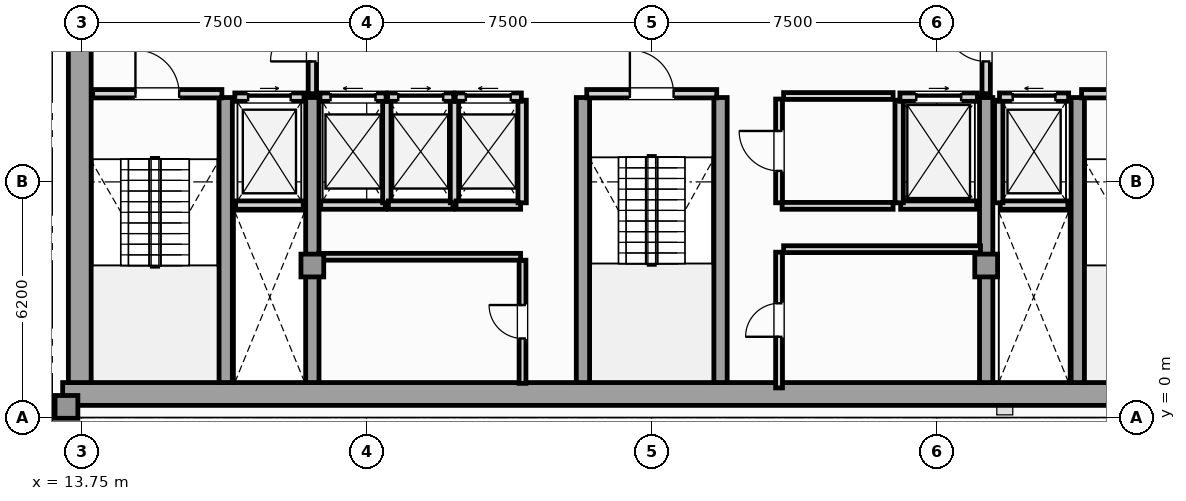
"""IFC4 building model, lengths in metres.
Left out: names, types, materials, properties, quantities, classifications, styles, units other than length and angle.
Written with IfcOpenShell. Run it as: python <this file> out.ifc"""

import sys

from ifc_helpers import new_model, si_unit, direction, frame, frame_2d, origin, origin_2d, place, context, subcontext, project, spatial, rectangle, extrude, element, fill, save


model = new_model("IFC4")
c1 = context("Model", 3, precision=1e-05, world=origin(), true_north=direction((0.0, 1.0)))
c2 = subcontext(c1, "Body", "Model", "MODEL_VIEW")
j1 = project(units=[si_unit("LENGTHUNIT", "METRE"), si_unit("PLANEANGLEUNIT", "RADIAN")], contexts=[c1])
p1 = place(None, origin())
s1 = spatial("IfcSite", under=j1, at=p1, CompositionType="ELEMENT")
p2 = place(p1, origin())
s2 = spatial("IfcBuilding", under=s1, at=p2, CompositionType="ELEMENT")
p3 = place(p2, frame((0.0, 0.0, 260.6)))
s3 = spatial("IfcBuildingStorey", under=s2, at=p3, CompositionType="ELEMENT", Elevation=260.6)
p4 = place(p3, frame((13.25, 0.62, 0.0), z_axis=(0.0, 0.0, 1.0), x_axis=(1.0, 0.0, 0.0)))
e1 = element("IfcWall", 1, at=p4, inside=s3, PredefinedType="SHEAR", context=c2, shape_type="SweptSolid", body=[
    extrude(rectangle(XDim=31.0, YDim=0.6, at=frame_2d((15.5, 0.0))), origin(), (0.0, 0.0, 1.0), 3.65),
])
p5 = place(p3, frame((13.7, 0.92, 0.0), z_axis=(0.0, 0.0, 1.0), x_axis=(0.0, 1.0, 0.0)))
e2 = element("IfcWall", 2, at=p5, inside=s3, PredefinedType="SHEAR", context=c2, shape_type="SweptSolid", body=[
    extrude(rectangle(XDim=10.53, YDim=0.6, at=frame_2d((5.265, 0.0))), origin(), (0.0, 0.0, 1.0), 3.65),
])
for number, where, z_axis, x_axis in (
    (3, (17.54, 0.92, 0.0), (0.0, 0.0, 1.0), (0.0, 1.0, 0.0)),
    (4, (19.82, 0.92, 0.0), (0.0, 0.0, 1.0), (0.0, 1.0, 0.0)),
    (5, (26.94, 0.92, 0.0), (0.0, 0.0, 1.0), (0.0, 1.0, 0.0)),
    (6, (30.56, 0.92, 0.0), (0.0, 0.0, 1.0), (0.0, 1.0, 0.0)),
    (7, (37.55, 0.92, 0.0), (0.0, 0.0, 1.0), (0.0, 1.0, 0.0)),
    (8, (39.96, 0.92, 0.0), (0.0, 0.0, 1.0), (0.0, 1.0, 0.0)),
):
    element("IfcWall", number, at=place(p3, frame(where, z_axis=z_axis, x_axis=x_axis)), inside=s3, PredefinedType="SHEAR", context=c2, shape_type="SweptSolid", body=[
        extrude(rectangle(XDim=7.5, YDim=0.35, at=frame_2d((3.75, 0.0))), origin(), (0.0, 0.0, 1.0), 3.65),
    ])
for number, where, z_axis, x_axis in (
    (9, (13.35, 0.28, 0.0), (0.0, 0.0, 1.0), (1.0, 0.0, 0.0)),
    (10, (19.82, 4.0, 0.0), (0.0, 0.0, 1.0), (1.0, 0.0, 0.0)),
    (11, (37.55, 4.0, 0.0), (0.0, 0.0, 1.0), (1.0, 0.0, 0.0)),
):
    element("IfcColumn", number, at=place(p3, frame(where, z_axis=z_axis, x_axis=x_axis)), inside=s3, PredefinedType="COLUMN", context=c2, shape_type="SweptSolid", body=[
        extrude(rectangle(XDim=0.6, YDim=0.6, at=origin_2d()), origin(), (0.0, 0.0, 1.0), 3.85),
    ])
p6 = place(p3, frame((11.238, 0.18, 0.0), z_axis=(0.0, 0.0, 1.0), x_axis=(1.0, 0.0, 0.0)))
e12 = element("IfcWall", 12, at=p6, inside=s3, PredefinedType="SOLIDWALL", context=c2, shape_type="SweptSolid", body=[
    extrude(rectangle(XDim=2.012, YDim=0.26, at=frame_2d((1.006, 0.0))), origin(), (0.0, 0.0, 1.0), 3.65),
])
p7 = place(p3, frame((17.8, 5.59, 0.0), z_axis=(0.0, 0.0, 1.0), x_axis=(1.0, 0.0, 0.0)))
e13 = element("IfcWall", 13, at=p7, inside=s3, PredefinedType="SOLIDWALL", context=c2, shape_type="SweptSolid", body=[
    extrude(rectangle(XDim=1.78, YDim=0.22, at=frame_2d((0.89, 0.0))), origin(), (0.0, 0.0, 1.0), 3.65),
])
p8 = place(p3, frame((17.78, 8.43, 0.0), z_axis=(0.0, 0.0, 1.0), x_axis=(1.0, 0.0, 0.0)))
e14 = element("IfcWall", 14, at=p8, inside=s3, PredefinedType="SOLIDWALL", context=c2, shape_type="SweptSolid", body=[
    extrude(rectangle(XDim=1.82, YDim=0.22, at=frame_2d((0.91, 0.0))), origin(), (0.0, 0.0, 1.0), 3.65),
])
p9 = place(p8, frame((0.35, 0.0, 0.0)))
e15 = element("IfcOpeningElement", 15, at=p9, cuts=e14, PredefinedType="OPENING", context=c2, shape_type="SweptSolid", body=[
    extrude(rectangle(XDim=1.12, YDim=2.25, at=frame_2d((0.56, 1.125))), frame((0.0, 0.12, 0.0), z_axis=(0.0, -1.0, 0.0), x_axis=(1.0, 0.0, 0.0)), (0.0, 0.0, 1.0), 0.24),
])
p10 = place(p3, frame((37.92, 5.59, 0.0), z_axis=(0.0, 0.0, 1.0), x_axis=(1.0, 0.0, 0.0)))
e16 = element("IfcWall", 16, at=p10, inside=s3, PredefinedType="SOLIDWALL", context=c2, shape_type="SweptSolid", body=[
    extrude(rectangle(XDim=1.78, YDim=0.22, at=frame_2d((0.89, 0.0))), origin(), (0.0, 0.0, 1.0), 3.65),
])
p11 = place(p3, frame((37.88, 5.65, 0.0), z_axis=(0.0, 0.0, 1.0), x_axis=(0.0, 1.0, 0.0)))
e17 = element("IfcWall", 17, at=p11, inside=s3, PredefinedType="SOLIDWALL", context=c2, shape_type="SweptSolid", body=[
    extrude(rectangle(XDim=2.7, YDim=0.22, at=frame_2d((1.35, 0.0))), origin(), (0.0, 0.0, 1.0), 3.65),
])
p12 = place(p3, frame((37.9, 8.43, 0.0), z_axis=(0.0, 0.0, 1.0), x_axis=(1.0, 0.0, 0.0)))
e18 = element("IfcWall", 18, at=p12, inside=s3, PredefinedType="SOLIDWALL", context=c2, shape_type="SweptSolid", body=[
    extrude(rectangle(XDim=1.82, YDim=0.22, at=frame_2d((0.91, 0.0))), origin(), (0.0, 0.0, 1.0), 3.65),
])
p13 = place(p12, frame((0.35, 0.0, 0.0)))
e19 = element("IfcOpeningElement", 19, at=p13, cuts=e18, PredefinedType="OPENING", context=c2, shape_type="SweptSolid", body=[
    extrude(rectangle(XDim=1.12, YDim=2.25, at=frame_2d((0.56, 1.125))), frame((0.0, 0.12, 0.0), z_axis=(0.0, -1.0, 0.0), x_axis=(1.0, 0.0, 0.0)), (0.0, 0.0, 1.0), 0.24),
])
p14 = place(p3, frame((35.3, 5.59, 0.0), z_axis=(0.0, 0.0, 1.0), x_axis=(1.0, 0.0, 0.0)))
e20 = element("IfcWall", 20, at=p14, inside=s3, PredefinedType="SOLIDWALL", context=c2, shape_type="SweptSolid", body=[
    extrude(rectangle(XDim=2.0, YDim=0.22, at=frame_2d((1.0, 0.0))), origin(), (0.0, 0.0, 1.0), 3.65),
])
p15 = place(p3, frame((35.26, 5.65, 0.0), z_axis=(0.0, 0.0, 1.0), x_axis=(0.0, 1.0, 0.0)))
e21 = element("IfcWall", 21, at=p15, inside=s3, PredefinedType="SOLIDWALL", context=c2, shape_type="SweptSolid", body=[
    extrude(rectangle(XDim=2.7, YDim=0.22, at=frame_2d((1.35, 0.0))), origin(), (0.0, 0.0, 1.0), 3.65),
])
p16 = place(p3, frame((35.28, 8.43, 0.0), z_axis=(0.0, 0.0, 1.0), x_axis=(1.0, 0.0, 0.0)))
e22 = element("IfcWall", 22, at=p16, inside=s3, PredefinedType="SOLIDWALL", context=c2, shape_type="SweptSolid", body=[
    extrude(rectangle(XDim=2.04, YDim=0.22, at=frame_2d((1.02, 0.0))), origin(), (0.0, 0.0, 1.0), 3.65),
])
p17 = place(p16, frame((0.43, 0.0, 0.0)))
e23 = element("IfcOpeningElement", 23, at=p17, cuts=e22, PredefinedType="OPENING", context=c2, shape_type="SweptSolid", body=[
    extrude(rectangle(XDim=1.18, YDim=2.2, at=frame_2d((0.59, 1.1))), frame((0.0, 0.12, 0.0), z_axis=(0.0, -1.0, 0.0), x_axis=(1.0, 0.0, 0.0)), (0.0, 0.0, 1.0), 0.24),
])
p18 = place(p3, frame((20.04, 5.59, 0.0), z_axis=(0.0, 0.0, 1.0), x_axis=(1.0, 0.0, 0.0)))
e24 = element("IfcWall", 24, at=p18, inside=s3, PredefinedType="SOLIDWALL", context=c2, shape_type="SweptSolid", body=[
    extrude(rectangle(XDim=1.7, YDim=0.22, at=frame_2d((0.85, 0.0))), origin(), (0.0, 0.0, 1.0), 3.65),
])
p19 = place(p3, frame((21.78, 5.65, 0.0), z_axis=(0.0, 0.0, 1.0), x_axis=(0.0, 1.0, 0.0)))
e25 = element("IfcWall", 25, at=p19, inside=s3, PredefinedType="SOLIDWALL", context=c2, shape_type="SweptSolid", body=[
    extrude(rectangle(XDim=2.7, YDim=0.22, at=frame_2d((1.35, 0.0))), origin(), (0.0, 0.0, 1.0), 3.65),
])
p20 = place(p3, frame((20.02, 8.43, 0.0), z_axis=(0.0, 0.0, 1.0), x_axis=(1.0, 0.0, 0.0)))
e26 = element("IfcWall", 26, at=p20, inside=s3, PredefinedType="SOLIDWALL", context=c2, shape_type="SweptSolid", body=[
    extrude(rectangle(XDim=1.74, YDim=0.22, at=frame_2d((0.87, 0.0))), origin(), (0.0, 0.0, 1.0), 3.65),
])
p21 = place(p20, frame((0.28, 0.0, 0.0)))
e27 = element("IfcOpeningElement", 27, at=p21, cuts=e26, PredefinedType="OPENING", context=c2, shape_type="SweptSolid", body=[
    extrude(rectangle(XDim=1.18, YDim=2.2, at=frame_2d((0.59, 1.1))), frame((0.0, 0.12, 0.0), z_axis=(0.0, -1.0, 0.0), x_axis=(1.0, 0.0, 0.0)), (0.0, 0.0, 1.0), 0.24),
])
p22 = place(p3, frame((21.82, 5.59, 0.0), z_axis=(0.0, 0.0, 1.0), x_axis=(1.0, 0.0, 0.0)))
e28 = element("IfcWall", 28, at=p22, inside=s3, PredefinedType="SOLIDWALL", context=c2, shape_type="SweptSolid", body=[
    extrude(rectangle(XDim=1.7, YDim=0.22, at=frame_2d((0.85, 0.0))), origin(), (0.0, 0.0, 1.0), 3.65),
])
p23 = place(p3, frame((23.56, 5.65, 0.0), z_axis=(0.0, 0.0, 1.0), x_axis=(0.0, 1.0, 0.0)))
e29 = element("IfcWall", 29, at=p23, inside=s3, PredefinedType="SOLIDWALL", context=c2, shape_type="SweptSolid", body=[
    extrude(rectangle(XDim=2.7, YDim=0.22, at=frame_2d((1.35, 0.0))), origin(), (0.0, 0.0, 1.0), 3.65),
])
p24 = place(p3, frame((21.8, 8.43, 0.0), z_axis=(0.0, 0.0, 1.0), x_axis=(1.0, 0.0, 0.0)))
e30 = element("IfcWall", 30, at=p24, inside=s3, PredefinedType="SOLIDWALL", context=c2, shape_type="SweptSolid", body=[
    extrude(rectangle(XDim=1.74, YDim=0.22, at=frame_2d((0.87, 0.0))), origin(), (0.0, 0.0, 1.0), 3.65),
])
p25 = place(p24, frame((0.28, 0.0, 0.0)))
e31 = element("IfcOpeningElement", 31, at=p25, cuts=e30, PredefinedType="OPENING", context=c2, shape_type="SweptSolid", body=[
    extrude(rectangle(XDim=1.18, YDim=2.2, at=frame_2d((0.59, 1.1))), frame((0.0, 0.12, 0.0), z_axis=(0.0, -1.0, 0.0), x_axis=(1.0, 0.0, 0.0)), (0.0, 0.0, 1.0), 0.24),
])
p26 = place(p3, frame((23.6, 5.59, 0.0), z_axis=(0.0, 0.0, 1.0), x_axis=(1.0, 0.0, 0.0)))
e32 = element("IfcWall", 32, at=p26, inside=s3, PredefinedType="SOLIDWALL", context=c2, shape_type="SweptSolid", body=[
    extrude(rectangle(XDim=1.7, YDim=0.22, at=frame_2d((0.85, 0.0))), origin(), (0.0, 0.0, 1.0), 3.65),
])
p27 = place(p3, frame((25.34, 5.65, 0.0), z_axis=(0.0, 0.0, 1.0), x_axis=(0.0, 1.0, 0.0)))
e33 = element("IfcWall", 33, at=p27, inside=s3, PredefinedType="SOLIDWALL", context=c2, shape_type="SweptSolid", body=[
    extrude(rectangle(XDim=2.7, YDim=0.22, at=frame_2d((1.35, 0.0))), origin(), (0.0, 0.0, 1.0), 3.65),
])
p28 = place(p3, frame((23.58, 8.43, 0.0), z_axis=(0.0, 0.0, 1.0), x_axis=(1.0, 0.0, 0.0)))
e34 = element("IfcWall", 34, at=p28, inside=s3, PredefinedType="SOLIDWALL", context=c2, shape_type="SweptSolid", body=[
    extrude(rectangle(XDim=1.74, YDim=0.22, at=frame_2d((0.87, 0.0))), origin(), (0.0, 0.0, 1.0), 3.65),
])
p29 = place(p28, frame((0.28, 0.0, 0.0)))
e35 = element("IfcOpeningElement", 35, at=p29, cuts=e34, PredefinedType="OPENING", context=c2, shape_type="SweptSolid", body=[
    extrude(rectangle(XDim=1.18, YDim=2.2, at=frame_2d((0.59, 1.1))), frame((0.0, 0.12, 0.0), z_axis=(0.0, -1.0, 0.0), x_axis=(1.0, 0.0, 0.0)), (0.0, 0.0, 1.0), 0.24),
])
p30 = place(p3, frame((14.04, 8.52, 0.0), z_axis=(0.0, 0.0, 1.0), x_axis=(1.0, 0.0, 0.0)))
e36 = element("IfcWall", 36, at=p30, inside=s3, PredefinedType="SOLIDWALL", context=c2, shape_type="SweptSolid", body=[
    extrude(rectangle(XDim=3.4, YDim=0.22, at=frame_2d((1.7, 0.0))), origin(), (0.0, 0.0, 1.0), 3.65),
])
p31 = place(p30, frame((1.125, 0.0, 0.0)))
e37 = element("IfcOpeningElement", 37, at=p31, cuts=e36, PredefinedType="OPENING", context=c2, shape_type="SweptSolid", body=[
    extrude(rectangle(XDim=1.15, YDim=2.2, at=frame_2d((0.575, 1.1))), frame((0.0, 0.12, 0.0), z_axis=(0.0, -1.0, 0.0), x_axis=(1.0, 0.0, 0.0)), (0.0, 0.0, 1.0), 0.24),
])
p32 = place(p3, frame((40.06, 8.52, 0.0), z_axis=(0.0, 0.0, 1.0), x_axis=(1.0, 0.0, 0.0)))
e38 = element("IfcWall", 38, at=p32, inside=s3, PredefinedType="SOLIDWALL", context=c2, shape_type="SweptSolid", body=[
    extrude(rectangle(XDim=3.4, YDim=0.22, at=frame_2d((1.7, 0.0))), origin(), (0.0, 0.0, 1.0), 3.65),
])
p33 = place(p32, frame((1.125, 0.0, 0.0)))
e39 = element("IfcOpeningElement", 39, at=p33, cuts=e38, PredefinedType="OPENING", context=c2, shape_type="SweptSolid", body=[
    extrude(rectangle(XDim=1.15, YDim=2.2, at=frame_2d((0.575, 1.1))), frame((0.0, 0.12, 0.0), z_axis=(0.0, -1.0, 0.0), x_axis=(1.0, 0.0, 0.0)), (0.0, 0.0, 1.0), 0.24),
])
p34 = place(p3, frame((27.04, 8.52, 0.0), z_axis=(0.0, 0.0, 1.0), x_axis=(1.0, 0.0, 0.0)))
e40 = element("IfcWall", 40, at=p34, inside=s3, PredefinedType="SOLIDWALL", context=c2, shape_type="SweptSolid", body=[
    extrude(rectangle(XDim=3.42, YDim=0.22, at=frame_2d((1.71, 0.0))), origin(), (0.0, 0.0, 1.0), 3.65),
])
p35 = place(p34, frame((1.135, 0.0, 0.0)))
e41 = element("IfcOpeningElement", 41, at=p35, cuts=e40, PredefinedType="OPENING", context=c2, shape_type="SweptSolid", body=[
    extrude(rectangle(XDim=1.15, YDim=2.2, at=frame_2d((0.575, 1.1))), frame((0.0, 0.12, 0.0), z_axis=(0.0, -1.0, 0.0), x_axis=(1.0, 0.0, 0.0)), (0.0, 0.0, 1.0), 0.24),
])
p36 = place(p3, frame((19.82, 8.52, 0.0), z_axis=(0.0, 0.0, 1.0), x_axis=(0.0, 1.0, 0.0)))
e42 = element("IfcWall", 42, at=p36, inside=s3, PredefinedType="SOLIDWALL", context=c2, shape_type="SweptSolid", body=[
    extrude(rectangle(XDim=2.8, YDim=0.22, at=frame_2d((1.4, 0.0))), origin(), (0.0, 0.0, 1.0), 3.105),
])
p37 = place(p36, frame((0.85, 0.0, 0.0)))
e43 = element("IfcOpeningElement", 43, at=p37, cuts=e42, PredefinedType="OPENING", context=c2, shape_type="SweptSolid", body=[
    extrude(rectangle(XDim=1.1, YDim=2.2, at=frame_2d((0.55, 1.1))), frame((0.0, 0.12, 0.0), z_axis=(0.0, -1.0, 0.0), x_axis=(1.0, 0.0, 0.0)), (0.0, 0.0, 1.0), 0.24),
])
p38 = place(p3, frame((37.55, 8.52, 0.0), z_axis=(0.0, 0.0, 1.0), x_axis=(0.0, 1.0, 0.0)))
e44 = element("IfcWall", 44, at=p38, inside=s3, PredefinedType="SOLIDWALL", context=c2, shape_type="SweptSolid", body=[
    extrude(rectangle(XDim=2.8, YDim=0.22, at=frame_2d((1.4, 0.0))), origin(), (0.0, 0.0, 1.0), 3.105),
])
p39 = place(p38, frame((0.85, 0.0, 0.0)))
e45 = element("IfcOpeningElement", 45, at=p39, cuts=e44, PredefinedType="OPENING", context=c2, shape_type="SweptSolid", body=[
    extrude(rectangle(XDim=1.1, YDim=2.2, at=frame_2d((0.55, 1.1))), frame((0.0, 0.12, 0.0), z_axis=(0.0, -1.0, 0.0), x_axis=(1.0, 0.0, 0.0)), (0.0, 0.0, 1.0), 0.24),
])
p40 = place(p3, frame((25.35, 0.9, 0.0), z_axis=(0.0, 0.0, 1.0), x_axis=(0.0, 1.0, 0.0)))
e46 = element("IfcWall", 46, at=p40, inside=s3, PredefinedType="PARTITIONING", context=c2, shape_type="SweptSolid", body=[
    extrude(rectangle(XDim=3.24, YDim=0.18, at=frame_2d((1.62, 0.0))), origin(), (0.0, 0.0, 1.0), 3.65),
])
p41 = place(p40, frame((1.18, 0.0, 0.0)))
e47 = element("IfcOpeningElement", 47, at=p41, cuts=e46, PredefinedType="OPENING", context=c2, shape_type="SweptSolid", body=[
    extrude(rectangle(XDim=0.88, YDim=2.05, at=frame_2d((0.44, 1.025))), frame((0.0, 0.1, 0.0), z_axis=(0.0, -1.0, 0.0), x_axis=(1.0, 0.0, 0.0)), (0.0, 0.0, 1.0), 0.2),
])
p42 = place(p3, frame((19.98, 4.23, 0.0), z_axis=(0.0, 0.0, 1.0), x_axis=(1.0, 0.0, 0.0)))
e48 = element("IfcWall", 48, at=p42, inside=s3, PredefinedType="PARTITIONING", context=c2, shape_type="SweptSolid", body=[
    extrude(rectangle(XDim=5.32, YDim=0.18, at=frame_2d((2.66, 0.0))), origin(), (0.0, 0.0, 1.0), 3.65),
])
p43 = place(p3, frame((32.1, 0.78, 0.0), z_axis=(0.0, 0.0, 1.0), x_axis=(0.0, 1.0, 0.0)))
e49 = element("IfcWall", 49, at=p43, inside=s3, PredefinedType="PARTITIONING", context=c2, shape_type="SweptSolid", body=[
    extrude(rectangle(XDim=3.57, YDim=0.18, at=frame_2d((1.785, 0.0))), origin(), (0.0, 0.0, 1.0), 3.65),
])
p44 = place(p43, frame((1.345, 0.0, 0.0)))
e50 = element("IfcOpeningElement", 50, at=p44, cuts=e49, PredefinedType="OPENING", context=c2, shape_type="SweptSolid", body=[
    extrude(rectangle(XDim=0.88, YDim=2.05, at=frame_2d((0.44, 1.025))), frame((0.0, 0.1, 0.0), z_axis=(0.0, -1.0, 0.0), x_axis=(1.0, 0.0, 0.0)), (0.0, 0.0, 1.0), 0.2),
])
p45 = place(p3, frame((32.22, 4.43, 0.0), z_axis=(0.0, 0.0, 1.0), x_axis=(1.0, 0.0, 0.0)))
e51 = element("IfcWall", 51, at=p45, inside=s3, PredefinedType="PARTITIONING", context=c2, shape_type="SweptSolid", body=[
    extrude(rectangle(XDim=5.18, YDim=0.18, at=frame_2d((2.59, 0.0))), origin(), (0.0, 0.0, 1.0), 3.65),
])
p46 = place(p3, frame((32.1, 5.65, 0.0), z_axis=(0.0, 0.0, 1.0), x_axis=(0.0, 1.0, 0.0)))
e52 = element("IfcWall", 52, at=p46, inside=s3, PredefinedType="PARTITIONING", context=c2, shape_type="SweptSolid", body=[
    extrude(rectangle(XDim=2.73, YDim=0.18, at=frame_2d((1.365, 0.0))), origin(), (0.0, 0.0, 1.0), 3.65),
])
p47 = place(p46, frame((0.84, 0.0, 0.0)))
e53 = element("IfcOpeningElement", 53, at=p47, cuts=e52, PredefinedType="OPENING", context=c2, shape_type="SweptSolid", body=[
    extrude(rectangle(XDim=1.05, YDim=2.15, at=frame_2d((0.525, 1.075))), frame((0.0, 0.1, 0.0), z_axis=(0.0, -1.0, 0.0), x_axis=(1.0, 0.0, 0.0)), (0.0, 0.0, 1.0), 0.2),
])
p48 = place(p3, frame((32.22, 8.46, 0.0), z_axis=(0.0, 0.0, 1.0), x_axis=(1.0, 0.0, 0.0)))
e54 = element("IfcWall", 54, at=p48, inside=s3, PredefinedType="PARTITIONING", context=c2, shape_type="SweptSolid", body=[
    extrude(rectangle(XDim=2.88, YDim=0.18, at=frame_2d((1.44, 0.0))), origin(), (0.0, 0.0, 1.0), 3.65),
])
p49 = place(p3, frame((32.18, 5.57, 0.0), z_axis=(0.0, 0.0, 1.0), x_axis=(1.0, 0.0, 0.0)))
e55 = element("IfcWall", 55, at=p49, inside=s3, PredefinedType="PARTITIONING", context=c2, shape_type="SweptSolid", body=[
    extrude(rectangle(XDim=2.92, YDim=0.18, at=frame_2d((1.46, 0.0))), origin(), (0.0, 0.0, 1.0), 3.65),
])
p50 = place(p9, origin())
e56 = element("IfcDoor", 56, at=p50, inside=s3, OperationType="SLIDING_TO_RIGHT", PredefinedType="DOOR", context=c2, shape_type="SweptSolid", body=[
    extrude(rectangle(XDim=1.12, YDim=2.25, at=frame_2d((0.56, 1.125))), frame((0.0, 0.025, 0.0), z_axis=(0.0, -1.0, 0.0), x_axis=(1.0, 0.0, 0.0)), (0.0, 0.0, 1.0), 0.05),
])
fill(e15, e56)
p51 = place(p13, origin())
e57 = element("IfcDoor", 57, at=p51, inside=s3, OperationType="SLIDING_TO_LEFT", PredefinedType="DOOR", context=c2, shape_type="SweptSolid", body=[
    extrude(rectangle(XDim=1.12, YDim=2.25, at=frame_2d((0.56, 1.125))), frame((0.0, 0.025, 0.0), z_axis=(0.0, -1.0, 0.0), x_axis=(1.0, 0.0, 0.0)), (0.0, 0.0, 1.0), 0.05),
])
fill(e19, e57)
p52 = place(p17, origin())
e58 = element("IfcDoor", 58, at=p52, inside=s3, OperationType="SLIDING_TO_RIGHT", PredefinedType="DOOR", context=c2, shape_type="SweptSolid", body=[
    extrude(rectangle(XDim=1.18, YDim=2.2, at=frame_2d((0.59, 1.1))), frame((0.0, 0.025, 0.0), z_axis=(0.0, -1.0, 0.0), x_axis=(1.0, 0.0, 0.0)), (0.0, 0.0, 1.0), 0.05),
])
fill(e23, e58)
p53 = place(p21, origin())
e59 = element("IfcDoor", 59, at=p53, inside=s3, OperationType="SLIDING_TO_LEFT", PredefinedType="DOOR", context=c2, shape_type="SweptSolid", body=[
    extrude(rectangle(XDim=1.18, YDim=2.2, at=frame_2d((0.59, 1.1))), frame((0.0, 0.025, 0.0), z_axis=(0.0, -1.0, 0.0), x_axis=(1.0, 0.0, 0.0)), (0.0, 0.0, 1.0), 0.05),
])
fill(e27, e59)
p54 = place(p25, origin())
e60 = element("IfcDoor", 60, at=p54, inside=s3, OperationType="SLIDING_TO_RIGHT", PredefinedType="DOOR", context=c2, shape_type="SweptSolid", body=[
    extrude(rectangle(XDim=1.18, YDim=2.2, at=frame_2d((0.59, 1.1))), frame((0.0, 0.025, 0.0), z_axis=(0.0, -1.0, 0.0), x_axis=(1.0, 0.0, 0.0)), (0.0, 0.0, 1.0), 0.05),
])
fill(e31, e60)
p55 = place(p29, origin())
e61 = element("IfcDoor", 61, at=p55, inside=s3, OperationType="SLIDING_TO_LEFT", PredefinedType="DOOR", context=c2, shape_type="SweptSolid", body=[
    extrude(rectangle(XDim=1.18, YDim=2.2, at=frame_2d((0.59, 1.1))), frame((0.0, 0.025, 0.0), z_axis=(0.0, -1.0, 0.0), x_axis=(1.0, 0.0, 0.0)), (0.0, 0.0, 1.0), 0.05),
])
fill(e35, e61)
p56 = place(p31, origin())
e62 = element("IfcDoor", 62, at=p56, inside=s3, OperationType="SINGLE_SWING_LEFT", PredefinedType="DOOR", context=c2, shape_type="SweptSolid", body=[
    extrude(rectangle(XDim=1.15, YDim=2.2, at=frame_2d((0.575, 1.1))), frame((0.0, 0.025, 0.0), z_axis=(0.0, -1.0, 0.0), x_axis=(1.0, 0.0, 0.0)), (0.0, 0.0, 1.0), 0.05),
])
fill(e37, e62)
p57 = place(p35, origin())
e63 = element("IfcDoor", 63, at=p57, inside=s3, OperationType="SINGLE_SWING_LEFT", PredefinedType="DOOR", context=c2, shape_type="SweptSolid", body=[
    extrude(rectangle(XDim=1.15, YDim=2.2, at=frame_2d((0.575, 1.1))), frame((0.0, 0.025, 0.0), z_axis=(0.0, -1.0, 0.0), x_axis=(1.0, 0.0, 0.0)), (0.0, 0.0, 1.0), 0.05),
])
fill(e41, e63)
p58 = place(p37, origin())
e64 = element("IfcDoor", 64, at=p58, inside=s3, OperationType="SINGLE_SWING_LEFT", PredefinedType="DOOR", context=c2, shape_type="SweptSolid", body=[
    extrude(rectangle(XDim=1.1, YDim=2.2, at=frame_2d((0.55, 1.1))), frame((0.0, 0.025, 0.0), z_axis=(0.0, -1.0, 0.0), x_axis=(1.0, 0.0, 0.0)), (0.0, 0.0, 1.0), 0.05),
])
fill(e43, e64)
p59 = place(p39, origin())
e65 = element("IfcDoor", 65, at=p59, inside=s3, OperationType="SINGLE_SWING_RIGHT", PredefinedType="DOOR", context=c2, shape_type="SweptSolid", body=[
    extrude(rectangle(XDim=1.1, YDim=2.2, at=frame_2d((0.55, 1.1))), frame((0.0, 0.025, 0.0), z_axis=(0.0, -1.0, 0.0), x_axis=(1.0, 0.0, 0.0)), (0.0, 0.0, 1.0), 0.05),
])
fill(e45, e65)
p60 = place(p41, origin())
e66 = element("IfcDoor", 66, at=p60, inside=s3, OperationType="SINGLE_SWING_RIGHT", PredefinedType="DOOR", context=c2, shape_type="SweptSolid", body=[
    extrude(rectangle(XDim=0.88, YDim=2.05, at=frame_2d((0.44, 1.025))), frame((0.0, 0.025, 0.0), z_axis=(0.0, -1.0, 0.0), x_axis=(1.0, 0.0, 0.0)), (0.0, 0.0, 1.0), 0.05),
])
fill(e47, e66)
p61 = place(p44, origin())
e67 = element("IfcDoor", 67, at=p61, inside=s3, OperationType="SINGLE_SWING_LEFT", PredefinedType="DOOR", context=c2, shape_type="SweptSolid", body=[
    extrude(rectangle(XDim=0.88, YDim=2.05, at=frame_2d((0.44, 1.025))), frame((0.0, 0.025, 0.0), z_axis=(0.0, -1.0, 0.0), x_axis=(1.0, 0.0, 0.0)), (0.0, 0.0, 1.0), 0.05),
])
fill(e50, e67)
p62 = place(p47, origin())
e68 = element("IfcDoor", 68, at=p62, inside=s3, OperationType="SINGLE_SWING_RIGHT", PredefinedType="DOOR", context=c2, shape_type="SweptSolid", body=[
    extrude(rectangle(XDim=1.05, YDim=2.15, at=frame_2d((0.525, 1.075))), frame((0.0, 0.025, 0.0), z_axis=(0.0, -1.0, 0.0), x_axis=(1.0, 0.0, 0.0)), (0.0, 0.0, 1.0), 0.05),
])
fill(e53, e68)
save(model, sys.argv[1])
